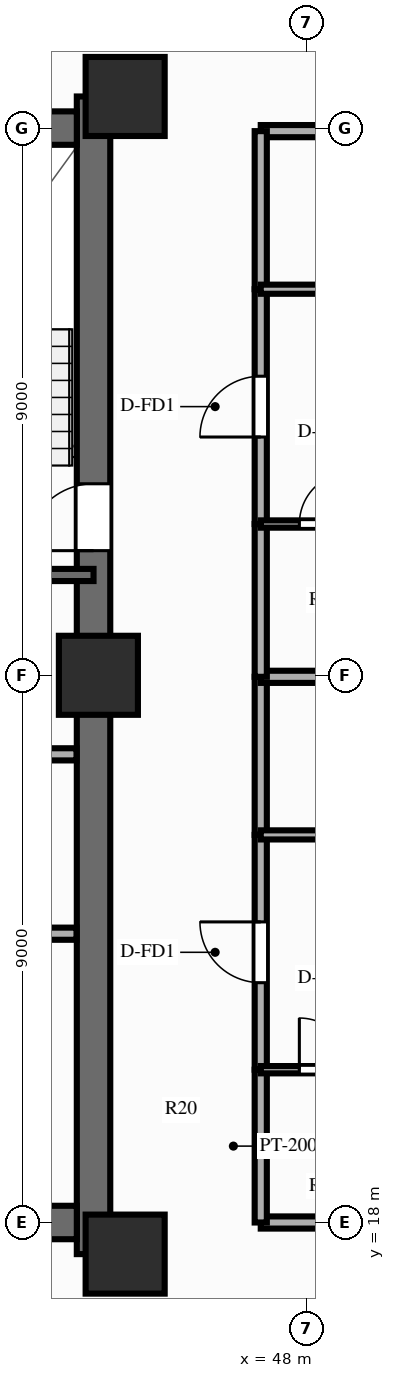
"""IFC4 building model, lengths in metres.
Left out: names, types, materials, properties, quantities, classifications, styles, units other than length and angle.
Written with IfcOpenShell. Run it as: python <this file> out.ifc"""

import sys

from ifc_helpers import new_model, si_unit, direction, frame, frame_2d, origin, origin_2d, place, context, subcontext, project, spatial, rectangle, extrude, source, transform, mapped, element, fill, save


model = new_model("IFC4")
c1 = context("Model", 3, precision=1e-05, world=origin(), true_north=direction((0.0, 1.0)))
c2 = subcontext(c1, "Body", "Model", "MODEL_VIEW")
j1 = project(units=[si_unit("LENGTHUNIT", "METRE"), si_unit("PLANEANGLEUNIT", "RADIAN")], contexts=[c1])
p1 = place(None, origin())
s1 = spatial("IfcSite", under=j1, at=p1, CompositionType="ELEMENT")
p2 = place(p1, origin())
s2 = spatial("IfcBuilding", under=s1, at=p2, CompositionType="ELEMENT")
p3 = place(p2, frame((0.0, 0.0, 77.85)))
s3 = spatial("IfcBuildingStorey", under=s2, at=p3, CompositionType="ELEMENT", Elevation=77.85)
p4 = place(p3, frame((44.5, 17.48, 0.0), z_axis=(0.0, 0.0, 1.0), x_axis=(0.0, 1.0, 0.0)))
e1 = element("IfcWall", 1, at=p4, inside=s3, PredefinedType="SHEAR", context=c2, shape_type="SweptSolid", body=[
    extrude(rectangle(XDim=19.04, YDim=0.55, at=frame_2d((9.52, 0.0))), origin(), (0.0, 0.0, 1.0), 3.0),
])
p5 = place(p4, frame((12.67, 0.0, 0.0), z_axis=(0.0, 0.0, 1.0), x_axis=(-1.0, 0.0, 0.0)))
e2 = element("IfcOpeningElement", 2, at=p5, cuts=e1, PredefinedType="OPENING", context=c2, shape_type="SweptSolid", body=[
    extrude(rectangle(XDim=1.1, YDim=2.15, at=frame_2d((0.55, 1.075))), frame((0.0, 0.287, 0.0), z_axis=(0.0, -1.0, 0.0), x_axis=(1.0, 0.0, 0.0)), (0.0, 0.0, 1.0), 0.574),
])
p6 = place(p3, frame((31.775, 18.0, 0.0), z_axis=(0.0, 0.0, 1.0), x_axis=(1.0, 0.0, 0.0)))
e3 = element("IfcWall", 3, at=p6, inside=s3, PredefinedType="SHEAR", context=c2, shape_type="SweptSolid", body=[
    extrude(rectangle(XDim=12.45, YDim=0.55, at=frame_2d((6.225, 0.0))), origin(), (0.0, 0.0, 1.0), 3.0),
])
p7 = place(p3, frame((31.775, 36.0, 0.0), z_axis=(0.0, 0.0, 1.0), x_axis=(1.0, 0.0, 0.0)))
e4 = element("IfcWall", 4, at=p7, inside=s3, PredefinedType="SHEAR", context=c2, shape_type="SweptSolid", body=[
    extrude(rectangle(XDim=12.45, YDim=0.55, at=frame_2d((6.225, 0.0))), origin(), (0.0, 0.0, 1.0), 3.0),
])
p8 = place(p7, frame((5.175, 0.0, 0.0), z_axis=(0.0, 0.0, 1.0), x_axis=(-1.0, 0.0, 0.0)))
e5 = element("IfcOpeningElement", 5, at=p8, cuts=e4, PredefinedType="OPENING", context=c2, shape_type="SweptSolid", body=[
    extrude(rectangle(XDim=1.4, YDim=2.15, at=frame_2d((0.7, 1.075))), frame((0.0, 0.287, 0.0), z_axis=(0.0, -1.0, 0.0), x_axis=(1.0, 0.0, 0.0)), (0.0, 0.0, 1.0), 0.574),
])
m1 = source(origin(), c2, "Body", "SweptSolid", [
    extrude(rectangle(XDim=1.3, YDim=1.3, at=origin_2d()), origin(), (0.0, 0.0, 1.0), 3.0),
])
for number, where, z_axis, x_axis in (
    (6, (45.02, 17.48, 0.0), (0.0, 0.0, 1.0), (1.0, 0.0, 0.0)),
    (7, (45.02, 36.52, 0.0), (0.0, 0.0, 1.0), (1.0, 0.0, 0.0)),
    (8, (44.58, 27.0, 0.0), (0.0, 0.0, 1.0), (1.0, 0.0, 0.0)),
):
    element("IfcColumn", number, at=place(p3, frame(where, z_axis=z_axis, x_axis=x_axis)), inside=s3, PredefinedType="COLUMN", context=c2, shape_type="MappedRepresentation", body=[
        mapped(m1, transform((0.0, 0.0, 0.0), scale=1.0)),
    ])
p9 = place(p3, frame((41.55, 22.75, 0.0), z_axis=(0.0, 0.0, 1.0), x_axis=(1.0, 0.0, 0.0)))
e9 = element("IfcWall", 9, at=p9, inside=s3, PredefinedType="PARTITIONING", context=c2, shape_type="SweptSolid", body=[
    extrude(rectangle(XDim=2.67, YDim=0.2, at=frame_2d((1.335, 0.0))), origin(), (0.0, 0.0, 1.0), 2.79),
])
p10 = place(p3, frame((41.55, 25.7, 0.0), z_axis=(0.0, 0.0, 1.0), x_axis=(1.0, 0.0, 0.0)))
e10 = element("IfcWall", 10, at=p10, inside=s3, PredefinedType="PARTITIONING", context=c2, shape_type="SweptSolid", body=[
    extrude(rectangle(XDim=2.67, YDim=0.2, at=frame_2d((1.335, 0.0))), origin(), (0.0, 0.0, 1.0), 2.14),
])
p11 = place(p3, frame((40.57, 28.65, 0.0), z_axis=(0.0, 0.0, 1.0), x_axis=(1.0, 0.0, 0.0)))
e11 = element("IfcWall", 11, at=p11, inside=s3, PredefinedType="SOLIDWALL", context=c2, shape_type="SweptSolid", body=[
    extrude(rectangle(XDim=3.93, YDim=0.2, at=frame_2d((1.965, 0.0))), origin(), (0.0, 0.0, 1.0), 2.79),
])
for number, where, z_axis, x_axis in (
    (12, (47.25, 18.0, 0.0), (0.0, 0.0, 1.0), (1.0, 0.0, 0.0)),
    (13, (47.25, 35.95, 0.0), (0.0, 0.0, 1.0), (1.0, 0.0, 0.0)),
):
    element("IfcWall", number, at=place(p3, frame(where, z_axis=z_axis, x_axis=x_axis)), inside=s3, PredefinedType="PARTITIONING", context=c2, shape_type="SweptSolid", body=[
        extrude(rectangle(XDim=16.6, YDim=0.2, at=frame_2d((8.3, 0.0))), origin(), (0.0, 0.0, 1.0), 2.34),
    ])
p12 = place(p3, frame((47.25, 18.0, 0.0), z_axis=(0.0, 0.0, 1.0), x_axis=(0.0, 1.0, 0.0)))
e14 = element("IfcWall", 14, at=p12, inside=s3, PredefinedType="PARTITIONING", context=c2, shape_type="SweptSolid", body=[
    extrude(rectangle(XDim=2.513, YDim=0.2, at=frame_2d((1.256, 0.0))), origin(), (0.0, 0.0, 1.0), 2.79),
])
p13 = place(p3, frame((47.25, 20.513, 0.0), z_axis=(0.0, 0.0, 1.0), x_axis=(0.0, 1.0, 0.0)))
e15 = element("IfcWall", 15, at=p13, inside=s3, PredefinedType="PARTITIONING", context=c2, shape_type="SweptSolid", body=[
    extrude(rectangle(XDim=3.862, YDim=0.2, at=frame_2d((1.931, 0.0))), origin(), (0.0, 0.0, 1.0), 2.79),
])
p14 = place(p13, frame((1.431, 0.0, 0.0)))
e16 = element("IfcOpeningElement", 16, at=p14, cuts=e15, PredefinedType="OPENING", context=c2, shape_type="SweptSolid", body=[
    extrude(rectangle(XDim=1.0, YDim=2.15, at=frame_2d((0.5, 1.075))), frame((0.0, 0.112, 0.0), z_axis=(0.0, -1.0, 0.0), x_axis=(1.0, 0.0, 0.0)), (0.0, 0.0, 1.0), 0.224),
])
p15 = place(p3, frame((47.25, 24.375, 0.0), z_axis=(0.0, 0.0, 1.0), x_axis=(0.0, 1.0, 0.0)))
e17 = element("IfcWall", 17, at=p15, inside=s3, PredefinedType="PARTITIONING", context=c2, shape_type="SweptSolid", body=[
    extrude(rectangle(XDim=2.6, YDim=0.2, at=frame_2d((1.3, 0.0))), origin(), (0.0, 0.0, 1.0), 2.79),
])
p16 = place(p3, frame((47.25, 20.513, 0.0), z_axis=(0.0, 0.0, 1.0), x_axis=(1.0, 0.0, 0.0)))
e18 = element("IfcWall", 18, at=p16, inside=s3, PredefinedType="PARTITIONING", context=c2, shape_type="SweptSolid", body=[
    extrude(rectangle(XDim=2.12, YDim=0.12, at=frame_2d((1.06, 0.0))), origin(), (0.0, 0.0, 1.0), 2.79),
])
p17 = place(p16, frame((0.635, 0.0, 0.0)))
e19 = element("IfcOpeningElement", 19, at=p17, cuts=e18, PredefinedType="OPENING", context=c2, shape_type="SweptSolid", body=[
    extrude(rectangle(XDim=0.85, YDim=2.05, at=frame_2d((0.425, 1.025))), frame((0.0, 0.072, 0.0), z_axis=(0.0, -1.0, 0.0), x_axis=(1.0, 0.0, 0.0)), (0.0, 0.0, 1.0), 0.144),
])
p18 = place(p3, frame((47.25, 24.375, 0.0), z_axis=(0.0, 0.0, 1.0), x_axis=(1.0, 0.0, 0.0)))
e20 = element("IfcWall", 20, at=p18, inside=s3, PredefinedType="PARTITIONING", context=c2, shape_type="SweptSolid", body=[
    extrude(rectangle(XDim=2.86, YDim=0.15, at=frame_2d((1.43, 0.0))), origin(), (0.0, 0.0, 1.0), 2.79),
])
p19 = place(p18, frame((0.98, 0.0, 0.0)))
e21 = element("IfcOpeningElement", 21, at=p19, cuts=e20, PredefinedType="OPENING", context=c2, shape_type="SweptSolid", body=[
    extrude(rectangle(XDim=0.9, YDim=2.1, at=frame_2d((0.45, 1.05))), frame((0.0, 0.087, 0.0), z_axis=(0.0, -1.0, 0.0), x_axis=(1.0, 0.0, 0.0)), (0.0, 0.0, 1.0), 0.174),
])
p20 = place(p3, frame((47.25, 26.975, 0.0), z_axis=(0.0, 0.0, 1.0), x_axis=(1.0, 0.0, 0.0)))
e22 = element("IfcWall", 22, at=p20, inside=s3, PredefinedType="PARTITIONING", context=c2, shape_type="SweptSolid", body=[
    extrude(rectangle(XDim=16.6, YDim=0.2, at=frame_2d((8.3, 0.0))), origin(), (0.0, 0.0, 1.0), 2.79),
])
p21 = place(p3, frame((47.25, 26.975, 0.0), z_axis=(0.0, 0.0, 1.0), x_axis=(0.0, 1.0, 0.0)))
e23 = element("IfcWall", 23, at=p21, inside=s3, PredefinedType="PARTITIONING", context=c2, shape_type="SweptSolid", body=[
    extrude(rectangle(XDim=2.513, YDim=0.2, at=frame_2d((1.256, 0.0))), origin(), (0.0, 0.0, 1.0), 2.79),
])
p22 = place(p3, frame((47.25, 29.488, 0.0), z_axis=(0.0, 0.0, 1.0), x_axis=(0.0, 1.0, 0.0)))
e24 = element("IfcWall", 24, at=p22, inside=s3, PredefinedType="PARTITIONING", context=c2, shape_type="SweptSolid", body=[
    extrude(rectangle(XDim=3.862, YDim=0.2, at=frame_2d((1.931, 0.0))), origin(), (0.0, 0.0, 1.0), 2.79),
])
p23 = place(p22, frame((1.431, 0.0, 0.0)))
e25 = element("IfcOpeningElement", 25, at=p23, cuts=e24, PredefinedType="OPENING", context=c2, shape_type="SweptSolid", body=[
    extrude(rectangle(XDim=1.0, YDim=2.15, at=frame_2d((0.5, 1.075))), frame((0.0, 0.112, 0.0), z_axis=(0.0, -1.0, 0.0), x_axis=(1.0, 0.0, 0.0)), (0.0, 0.0, 1.0), 0.224),
])
p24 = place(p3, frame((47.25, 33.35, 0.0), z_axis=(0.0, 0.0, 1.0), x_axis=(0.0, 1.0, 0.0)))
e26 = element("IfcWall", 26, at=p24, inside=s3, PredefinedType="PARTITIONING", context=c2, shape_type="SweptSolid", body=[
    extrude(rectangle(XDim=2.6, YDim=0.2, at=frame_2d((1.3, 0.0))), origin(), (0.0, 0.0, 1.0), 2.79),
])
p25 = place(p3, frame((47.25, 29.488, 0.0), z_axis=(0.0, 0.0, 1.0), x_axis=(1.0, 0.0, 0.0)))
e27 = element("IfcWall", 27, at=p25, inside=s3, PredefinedType="PARTITIONING", context=c2, shape_type="SweptSolid", body=[
    extrude(rectangle(XDim=2.12, YDim=0.12, at=frame_2d((1.06, 0.0))), origin(), (0.0, 0.0, 1.0), 2.79),
])
p26 = place(p25, frame((0.635, 0.0, 0.0)))
e28 = element("IfcOpeningElement", 28, at=p26, cuts=e27, PredefinedType="OPENING", context=c2, shape_type="SweptSolid", body=[
    extrude(rectangle(XDim=0.85, YDim=2.05, at=frame_2d((0.425, 1.025))), frame((0.0, 0.072, 0.0), z_axis=(0.0, -1.0, 0.0), x_axis=(1.0, 0.0, 0.0)), (0.0, 0.0, 1.0), 0.144),
])
p27 = place(p3, frame((47.25, 33.35, 0.0), z_axis=(0.0, 0.0, 1.0), x_axis=(1.0, 0.0, 0.0)))
e29 = element("IfcWall", 29, at=p27, inside=s3, PredefinedType="PARTITIONING", context=c2, shape_type="SweptSolid", body=[
    extrude(rectangle(XDim=2.86, YDim=0.15, at=frame_2d((1.43, 0.0))), origin(), (0.0, 0.0, 1.0), 2.79),
])
p28 = place(p27, frame((0.98, 0.0, 0.0)))
e30 = element("IfcOpeningElement", 30, at=p28, cuts=e29, PredefinedType="OPENING", context=c2, shape_type="SweptSolid", body=[
    extrude(rectangle(XDim=0.9, YDim=2.1, at=frame_2d((0.45, 1.05))), frame((0.0, 0.087, 0.0), z_axis=(0.0, -1.0, 0.0), x_axis=(1.0, 0.0, 0.0)), (0.0, 0.0, 1.0), 0.174),
])
m2 = source(origin(), c2, "Body", "SweptSolid", [
    extrude(rectangle(XDim=1.1, YDim=2.15, at=frame_2d((0.55, 1.075))), frame((0.0, 0.025, 0.0), z_axis=(0.0, -1.0, 0.0), x_axis=(1.0, 0.0, 0.0)), (0.0, 0.0, 1.0), 0.05),
])
p29 = place(p5, origin())
e31 = element("IfcDoor", 31, at=p29, inside=s3, OperationType="SINGLE_SWING_RIGHT", PredefinedType="DOOR", context=c2, shape_type="MappedRepresentation", body=[
    mapped(m2, transform((0.0, 0.0, 0.0), scale=1.0)),
])
fill(e2, e31)
m3 = source(origin(), c2, "Body", "SweptSolid", [
    extrude(rectangle(XDim=1.0, YDim=2.15, at=frame_2d((0.5, 1.075))), frame((0.0, 0.025, 0.0), z_axis=(0.0, -1.0, 0.0), x_axis=(1.0, 0.0, 0.0)), (0.0, 0.0, 1.0), 0.05),
])
p30 = place(p14, origin())
e32 = element("IfcDoor", 32, at=p30, inside=s3, OperationType="SINGLE_SWING_RIGHT", PredefinedType="DOOR", context=c2, shape_type="MappedRepresentation", body=[
    mapped(m3, transform((0.0, 0.0, 0.0), scale=1.0)),
])
fill(e16, e32)
m4 = source(origin(), c2, "Body", "SweptSolid", [
    extrude(rectangle(XDim=0.85, YDim=2.05, at=frame_2d((0.425, 1.025))), frame((0.0, 0.025, 0.0), z_axis=(0.0, -1.0, 0.0), x_axis=(1.0, 0.0, 0.0)), (0.0, 0.0, 1.0), 0.05),
])
p31 = place(p17, origin())
e33 = element("IfcDoor", 33, at=p31, inside=s3, OperationType="SINGLE_SWING_LEFT", PredefinedType="DOOR", context=c2, shape_type="MappedRepresentation", body=[
    mapped(m4, transform((0.0, 0.0, 0.0), scale=1.0)),
])
fill(e19, e33)
p32 = place(p23, origin())
e34 = element("IfcDoor", 34, at=p32, inside=s3, OperationType="SINGLE_SWING_LEFT", PredefinedType="DOOR", context=c2, shape_type="MappedRepresentation", body=[
    mapped(m3, transform((0.0, 0.0, 0.0), scale=1.0)),
])
fill(e25, e34)
p33 = place(p26, origin())
e35 = element("IfcDoor", 35, at=p33, inside=s3, OperationType="SINGLE_SWING_RIGHT", PredefinedType="DOOR", context=c2, shape_type="MappedRepresentation", body=[
    mapped(m4, transform((0.0, 0.0, 0.0), scale=1.0)),
])
fill(e28, e35)
save(model, sys.argv[1])
